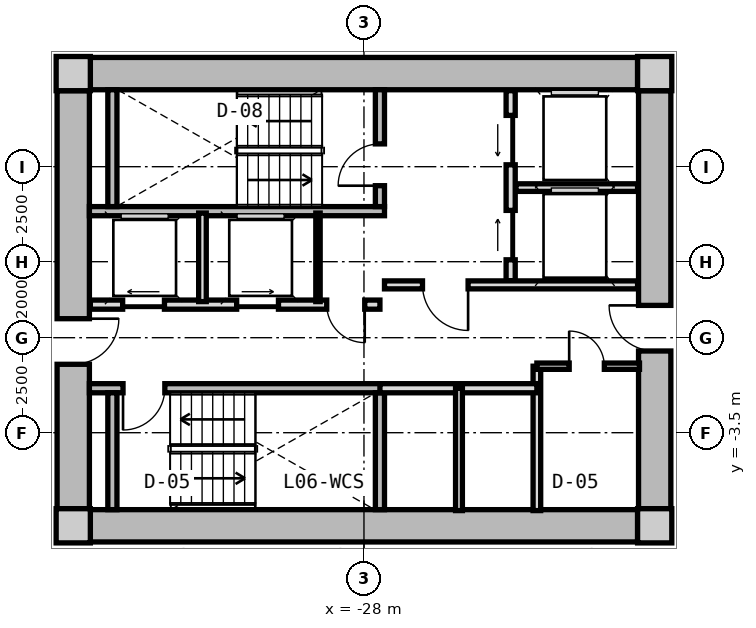
"""IFC4 building model, lengths in metres.
Left out: names, types, materials, properties, quantities, classifications, styles, units other than length and angle.
Written with IfcOpenShell. Run it as: python <this file> out.ifc"""

import sys

from ifc_helpers import new_model, si_unit, direction, frame, frame_2d, origin, origin_2d, place, context, subcontext, project, spatial, rectangle, extrude, source, transform, mapped, element, fill, save


model = new_model("IFC4")
c1 = context("Model", 3, precision=1e-05, world=origin(), true_north=direction((0.0, 1.0)))
c2 = subcontext(c1, "Body", "Model", "MODEL_VIEW")
j1 = project(units=[si_unit("LENGTHUNIT", "METRE"), si_unit("PLANEANGLEUNIT", "RADIAN")], contexts=[c1])
p1 = place(None, origin())
s1 = spatial("IfcSite", under=j1, at=p1, CompositionType="ELEMENT")
p2 = place(p1, origin())
s2 = spatial("IfcBuilding", under=s1, at=p2, CompositionType="ELEMENT")
p3 = place(p2, frame((0.0, 0.0, 24.65)))
s3 = spatial("IfcBuildingStorey", under=s2, at=p3, CompositionType="ELEMENT", Elevation=24.65)
m1 = source(origin(), c2, "Body", "SweptSolid", [
    extrude(rectangle(XDim=0.9, YDim=0.9, at=origin_2d()), origin(), (0.0, 0.0, 1.0), 3.05),
])
for number, where, z_axis, x_axis in (
    (1, (-35.65, -5.95, 0.0), (0.0, 0.0, 1.0), (1.0, 0.0, 0.0)),
    (2, (-20.35, -5.95, 0.0), (0.0, 0.0, 1.0), (1.0, 0.0, 0.0)),
    (3, (-20.35, 5.95, 0.0), (0.0, 0.0, 1.0), (1.0, 0.0, 0.0)),
    (4, (-35.65, 5.95, 0.0), (0.0, 0.0, 1.0), (1.0, 0.0, 0.0)),
):
    element("IfcColumn", number, at=place(p3, frame(where, z_axis=z_axis, x_axis=x_axis)), inside=s3, PredefinedType="COLUMN", context=c2, shape_type="MappedRepresentation", body=[
        mapped(m1, transform((0.0, 0.0, 0.0), x_axis=(1.0, 0.0, 0.0), y_axis=(0.0, 1.0, 0.0), z_axis=(0.0, 0.0, 1.0), scale=1.0)),
    ])
m2 = source(origin(), c2, "Body", "SweptSolid", [
    extrude(rectangle(XDim=14.4, YDim=0.85, at=frame_2d((7.2, 0.0))), origin(), (0.0, 0.0, 1.0), 2.79),
])
for number, where, z_axis, x_axis in (
    (5, (-35.2, 5.95, 0.0), (0.0, 0.0, 1.0), (1.0, 0.0, 0.0)),
    (6, (-20.8, -5.95, 0.0), (0.0, 0.0, 1.0), (-1.0, 0.0, 0.0)),
):
    element("IfcWall", number, at=place(p3, frame(where, z_axis=z_axis, x_axis=x_axis)), inside=s3, PredefinedType="SHEAR", context=c2, shape_type="MappedRepresentation", body=[
        mapped(m2, transform((0.0, 0.0, 0.0), x_axis=(1.0, 0.0, 0.0), y_axis=(0.0, 1.0, 0.0), z_axis=(0.0, 0.0, 1.0), scale=1.0)),
    ])
m3 = source(origin(), c2, "Body", "SweptSolid", [
    extrude(rectangle(XDim=11.0, YDim=0.85, at=frame_2d((5.5, 0.0))), origin(), (0.0, 0.0, 1.0), 2.79),
])
p4 = place(p3, frame((-35.65, -5.5, 0.0), z_axis=(0.0, 0.0, 1.0), x_axis=(0.0, 1.0, 0.0)))
e7 = element("IfcWall", 7, at=p4, inside=s3, PredefinedType="SHEAR", context=c2, shape_type="MappedRepresentation", body=[
    mapped(m3, transform((0.0, 0.0, 0.0), x_axis=(1.0, 0.0, 0.0), y_axis=(0.0, 1.0, 0.0), z_axis=(0.0, 0.0, 1.0), scale=1.0)),
])
p5 = place(p4, frame((3.8, 0.0, 0.0)))
e8 = element("IfcOpeningElement", 8, at=p5, cuts=e7, PredefinedType="OPENING", context=c2, shape_type="SweptSolid", body=[
    extrude(rectangle(XDim=1.2, YDim=2.15, at=frame_2d((0.6, 1.075))), frame((0.0, 0.435, 0.0), z_axis=(0.0, -1.0, 0.0), x_axis=(1.0, 0.0, 0.0)), (0.0, 0.0, 1.0), 0.87),
])
p6 = place(p3, frame((-20.35, 5.5, 0.0), z_axis=(0.0, 0.0, 1.0), x_axis=(0.0, -1.0, 0.0)))
e9 = element("IfcWall", 9, at=p6, inside=s3, PredefinedType="SHEAR", context=c2, shape_type="MappedRepresentation", body=[
    mapped(m3, transform((0.0, 0.0, 0.0), x_axis=(1.0, 0.0, 0.0), y_axis=(0.0, 1.0, 0.0), z_axis=(0.0, 0.0, 1.0), scale=1.0)),
])
p7 = place(p6, frame((5.65, 0.0, 0.0)))
e10 = element("IfcOpeningElement", 10, at=p7, cuts=e9, PredefinedType="OPENING", context=c2, shape_type="SweptSolid", body=[
    extrude(rectangle(XDim=1.2, YDim=2.15, at=frame_2d((0.6, 1.075))), frame((0.0, 0.435, 0.0), z_axis=(0.0, -1.0, 0.0), x_axis=(1.0, 0.0, 0.0)), (0.0, 0.0, 1.0), 0.87),
])
m4 = source(origin(), c2, "Body", "SweptSolid", [
    extrude(rectangle(XDim=7.765, YDim=0.24, at=frame_2d((3.883, 0.0))), origin(), (0.0, 0.0, 1.0), 2.79),
])
p8 = place(p3, frame((-35.225, 2.33, 0.0), z_axis=(0.0, 0.0, 1.0), x_axis=(1.0, 0.0, 0.0)))
e11 = element("IfcWall", 11, at=p8, inside=s3, PredefinedType="PARTITIONING", context=c2, shape_type="MappedRepresentation", body=[
    mapped(m4, transform((0.0, 0.0, 0.0), x_axis=(1.0, 0.0, 0.0), y_axis=(0.0, 1.0, 0.0), z_axis=(0.0, 0.0, 1.0), scale=1.0)),
])
m5 = source(origin(), c2, "Body", "SweptSolid", [
    extrude(rectangle(XDim=3.075, YDim=0.24, at=frame_2d((1.538, 0.0))), origin(), (0.0, 0.0, 1.0), 2.79),
])
p9 = place(p3, frame((-34.62, 2.45, 0.0), z_axis=(0.0, 0.0, 1.0), x_axis=(0.0, 1.0, 0.0)))
e12 = element("IfcWall", 12, at=p9, inside=s3, PredefinedType="PARTITIONING", context=c2, shape_type="MappedRepresentation", body=[
    mapped(m5, transform((0.0, 0.0, 0.0), x_axis=(1.0, 0.0, 0.0), y_axis=(0.0, 1.0, 0.0), z_axis=(0.0, 0.0, 1.0), scale=1.0)),
])
p10 = place(p3, frame((-27.58, 2.45, 0.0), z_axis=(0.0, 0.0, 1.0), x_axis=(0.0, 1.0, 0.0)))
e13 = element("IfcWall", 13, at=p10, inside=s3, PredefinedType="PARTITIONING", context=c2, shape_type="MappedRepresentation", body=[
    mapped(m5, transform((0.0, 0.0, 0.0), x_axis=(1.0, 0.0, 0.0), y_axis=(0.0, 1.0, 0.0), z_axis=(0.0, 0.0, 1.0), scale=1.0)),
])
p11 = place(p10, frame((0.55, 0.0, 0.0)))
e14 = element("IfcOpeningElement", 14, at=p11, cuts=e13, PredefinedType="OPENING", context=c2, shape_type="SweptSolid", body=[
    extrude(rectangle(XDim=1.1, YDim=2.15, at=frame_2d((0.55, 1.075))), frame((0.0, 0.13, 0.0), z_axis=(0.0, -1.0, 0.0), x_axis=(1.0, 0.0, 0.0)), (0.0, 0.0, 1.0), 0.26),
])
p12 = place(p3, frame((-35.225, -2.33, 0.0), z_axis=(0.0, 0.0, 1.0), x_axis=(1.0, 0.0, 0.0)))
e15 = element("IfcWall", 15, at=p12, inside=s3, PredefinedType="PARTITIONING", context=c2, shape_type="MappedRepresentation", body=[
    mapped(m4, transform((0.0, 0.0, 0.0), x_axis=(1.0, 0.0, 0.0), y_axis=(0.0, 1.0, 0.0), z_axis=(0.0, 0.0, 1.0), scale=1.0)),
])
p13 = place(p12, frame((0.885, 0.0, 0.0)))
e16 = element("IfcOpeningElement", 16, at=p13, cuts=e15, PredefinedType="OPENING", context=c2, shape_type="SweptSolid", body=[
    extrude(rectangle(XDim=1.1, YDim=2.15, at=frame_2d((0.55, 1.075))), frame((0.0, 0.13, 0.0), z_axis=(0.0, -1.0, 0.0), x_axis=(1.0, 0.0, 0.0)), (0.0, 0.0, 1.0), 0.26),
])
for number, where, z_axis, x_axis in (
    (17, (-34.62, -5.525, 0.0), (0.0, 0.0, 1.0), (0.0, 1.0, 0.0)),
    (18, (-27.58, -5.525, 0.0), (0.0, 0.0, 1.0), (0.0, 1.0, 0.0)),
):
    element("IfcWall", number, at=place(p3, frame(where, z_axis=z_axis, x_axis=x_axis)), inside=s3, PredefinedType="PARTITIONING", context=c2, shape_type="MappedRepresentation", body=[
        mapped(m5, transform((0.0, 0.0, 0.0), x_axis=(1.0, 0.0, 0.0), y_axis=(0.0, 1.0, 0.0), z_axis=(0.0, 0.0, 1.0), scale=1.0)),
    ])
m6 = source(origin(), c2, "Body", "SweptSolid", [
    extrude(rectangle(XDim=5.0, YDim=0.24, at=frame_2d((2.5, 0.0))), origin(), (0.0, 0.0, 1.0), 2.775),
])
p14 = place(p3, frame((-24.14, 0.5, 0.0), z_axis=(0.0, 0.0, 1.0), x_axis=(0.0, 1.0, 0.0)))
e19 = element("IfcWall", 19, at=p14, inside=s3, PredefinedType="PARTITIONING", context=c2, shape_type="MappedRepresentation", body=[
    mapped(m6, transform((0.0, 0.0, 0.0), x_axis=(1.0, 0.0, 0.0), y_axis=(0.0, 1.0, 0.0), z_axis=(0.0, 0.0, 1.0), scale=1.0)),
])
p15 = place(p14, frame((3.05, 0.0, 0.0)))
e20 = element("IfcOpeningElement", 20, at=p15, cuts=e19, PredefinedType="OPENING", context=c2, shape_type="SweptSolid", body=[
    extrude(rectangle(XDim=1.3, YDim=2.2, at=frame_2d((0.65, 1.1))), frame((0.0, 0.13, 0.0), z_axis=(0.0, -1.0, 0.0), x_axis=(1.0, 0.0, 0.0)), (0.0, 0.0, 1.0), 0.26),
])
p16 = place(p14, frame((0.55, 0.0, 0.0)))
e21 = element("IfcOpeningElement", 21, at=p16, cuts=e19, PredefinedType="OPENING", context=c2, shape_type="SweptSolid", body=[
    extrude(rectangle(XDim=1.3, YDim=2.2, at=frame_2d((0.65, 1.1))), frame((0.0, 0.13, 0.0), z_axis=(0.0, -1.0, 0.0), x_axis=(1.0, 0.0, 0.0)), (0.0, 0.0, 1.0), 0.26),
])
m7 = source(origin(), c2, "Body", "SweptSolid", [
    extrude(rectangle(XDim=3.2, YDim=0.2, at=frame_2d((1.6, 0.0))), origin(), (0.0, 0.0, 1.0), 2.775),
])
p17 = place(p3, frame((-24.0, 2.95, 0.0), z_axis=(0.0, 0.0, 1.0), x_axis=(1.0, 0.0, 0.0)))
e22 = element("IfcWall", 22, at=p17, inside=s3, PredefinedType="PARTITIONING", context=c2, shape_type="MappedRepresentation", body=[
    mapped(m7, transform((0.0, 0.0, 0.0), x_axis=(1.0, 0.0, 0.0), y_axis=(0.0, 1.0, 0.0), z_axis=(0.0, 0.0, 1.0), scale=1.0)),
])
m8 = source(origin(), c2, "Body", "SweptSolid", [
    extrude(rectangle(XDim=6.66, YDim=0.21, at=frame_2d((3.33, 0.0))), origin(), (0.0, 0.0, 1.0), 2.775),
])
p18 = place(p3, frame((-27.46, 0.39, 0.0), z_axis=(0.0, 0.0, 1.0), x_axis=(1.0, 0.0, 0.0)))
e23 = element("IfcWall", 23, at=p18, inside=s3, PredefinedType="PARTITIONING", context=c2, shape_type="MappedRepresentation", body=[
    mapped(m8, transform((0.0, 0.0, 0.0), x_axis=(1.0, 0.0, 0.0), y_axis=(0.0, 1.0, 0.0), z_axis=(0.0, 0.0, 1.0), scale=1.0)),
])
p19 = place(p18, frame((1.0, 0.0, 0.0)))
e24 = element("IfcOpeningElement", 24, at=p19, cuts=e23, PredefinedType="OPENING", context=c2, shape_type="SweptSolid", body=[
    extrude(rectangle(XDim=1.2, YDim=2.15, at=frame_2d((0.6, 1.075))), frame((0.0, 0.115, 0.0), z_axis=(0.0, -1.0, 0.0), x_axis=(1.0, 0.0, 0.0)), (0.0, 0.0, 1.0), 0.23),
])
m9 = source(origin(), c2, "Body", "SweptSolid", [
    extrude(rectangle(XDim=7.62, YDim=0.24, at=frame_2d((3.81, 0.0))), origin(), (0.0, 0.0, 1.0), 2.775),
])
p20 = place(p3, frame((-35.2, -0.13, 0.0), z_axis=(0.0, 0.0, 1.0), x_axis=(1.0, 0.0, 0.0)))
e25 = element("IfcWall", 25, at=p20, inside=s3, PredefinedType="PARTITIONING", context=c2, shape_type="MappedRepresentation", body=[
    mapped(m9, transform((0.0, 0.0, 0.0), x_axis=(1.0, 0.0, 0.0), y_axis=(0.0, 1.0, 0.0), z_axis=(0.0, 0.0, 1.0), scale=1.0)),
])
p21 = place(p20, frame((6.22, 0.0, 0.0)))
e26 = element("IfcOpeningElement", 26, at=p21, cuts=e25, PredefinedType="OPENING", context=c2, shape_type="SweptSolid", body=[
    extrude(rectangle(XDim=1.0, YDim=2.1, at=frame_2d((0.5, 1.05))), frame((0.0, 0.13, 0.0), z_axis=(0.0, -1.0, 0.0), x_axis=(1.0, 0.0, 0.0)), (0.0, 0.0, 1.0), 0.26),
])
p22 = place(p20, frame((0.85, 0.0, 0.0)))
e27 = element("IfcOpeningElement", 27, at=p22, cuts=e25, PredefinedType="OPENING", context=c2, shape_type="SweptSolid", body=[
    extrude(rectangle(XDim=1.1, YDim=2.2, at=frame_2d((0.55, 1.1))), frame((0.0, 0.13, 0.0), z_axis=(0.0, -1.0, 0.0), x_axis=(1.0, 0.0, 0.0)), (0.0, 0.0, 1.0), 0.26),
])
p23 = place(p20, frame((3.85, 0.0, 0.0)))
e28 = element("IfcOpeningElement", 28, at=p23, cuts=e25, PredefinedType="OPENING", context=c2, shape_type="SweptSolid", body=[
    extrude(rectangle(XDim=1.1, YDim=2.2, at=frame_2d((0.55, 1.1))), frame((0.0, 0.13, 0.0), z_axis=(0.0, -1.0, 0.0), x_axis=(1.0, 0.0, 0.0)), (0.0, 0.0, 1.0), 0.26),
])
m10 = source(origin(), c2, "Body", "SweptSolid", [
    extrude(rectangle(XDim=2.33, YDim=0.115, at=frame_2d((1.165, 0.0))), origin(), (0.0, 0.0, 1.0), 2.775),
])
p24 = place(p3, frame((-29.21, -0.05, 0.0), z_axis=(0.0, 0.0, 1.0), x_axis=(0.0, 1.0, 0.0)))
e29 = element("IfcWall", 29, at=p24, inside=s3, PredefinedType="PARTITIONING", context=c2, shape_type="MappedRepresentation", body=[
    mapped(m10, transform((0.0, 0.0, 0.0), x_axis=(1.0, 0.0, 0.0), y_axis=(0.0, 1.0, 0.0), z_axis=(0.0, 0.0, 1.0), scale=1.0)),
])
m11 = source(origin(), c2, "Body", "SweptSolid", [
    extrude(rectangle(XDim=2.33, YDim=0.2, at=frame_2d((1.165, 0.0))), origin(), (0.0, 0.0, 1.0), 2.775),
])
p25 = place(p3, frame((-32.25, -0.05, 0.0), z_axis=(0.0, 0.0, 1.0), x_axis=(0.0, 1.0, 0.0)))
e30 = element("IfcWall", 30, at=p25, inside=s3, PredefinedType="PARTITIONING", context=c2, shape_type="MappedRepresentation", body=[
    mapped(m11, transform((0.0, 0.0, 0.0), x_axis=(1.0, 0.0, 0.0), y_axis=(0.0, 1.0, 0.0), z_axis=(0.0, 0.0, 1.0), scale=1.0)),
])
m12 = source(origin(), c2, "Body", "SweptSolid", [
    extrude(rectangle(XDim=3.8, YDim=0.2, at=frame_2d((1.9, 0.0))), origin(), (0.0, 0.0, 1.0), 2.775),
])
p26 = place(p3, frame((-23.45, -5.55, 0.0), z_axis=(0.0, 0.0, 1.0), x_axis=(0.0, 1.0, 0.0)))
e31 = element("IfcWall", 31, at=p26, inside=s3, PredefinedType="PARTITIONING", context=c2, shape_type="MappedRepresentation", body=[
    mapped(m12, transform((0.0, 0.0, 0.0), x_axis=(1.0, 0.0, 0.0), y_axis=(0.0, 1.0, 0.0), z_axis=(0.0, 0.0, 1.0), scale=1.0)),
])
m13 = source(origin(), c2, "Body", "SweptSolid", [
    extrude(rectangle(XDim=4.13, YDim=0.24, at=frame_2d((2.065, 0.0))), origin(), (0.0, 0.0, 1.0), 2.775),
])
p27 = place(p3, frame((-27.58, -2.33, 0.0), z_axis=(0.0, 0.0, 1.0), x_axis=(1.0, 0.0, 0.0)))
e32 = element("IfcWall", 32, at=p27, inside=s3, PredefinedType="PARTITIONING", context=c2, shape_type="MappedRepresentation", body=[
    mapped(m13, transform((0.0, 0.0, 0.0), x_axis=(1.0, 0.0, 0.0), y_axis=(0.0, 1.0, 0.0), z_axis=(0.0, 0.0, 1.0), scale=1.0)),
])
m14 = source(origin(), c2, "Body", "SweptSolid", [
    extrude(rectangle(XDim=3.22, YDim=0.18, at=frame_2d((1.61, 0.0))), origin(), (0.0, 0.0, 1.0), 2.775),
])
p28 = place(p3, frame((-25.5, -5.55, 0.0), z_axis=(0.0, 0.0, 1.0), x_axis=(0.0, 1.0, 0.0)))
e33 = element("IfcWall", 33, at=p28, inside=s3, PredefinedType="PARTITIONING", context=c2, shape_type="MappedRepresentation", body=[
    mapped(m14, transform((0.0, 0.0, 0.0), x_axis=(1.0, 0.0, 0.0), y_axis=(0.0, 1.0, 0.0), z_axis=(0.0, 0.0, 1.0), scale=1.0)),
])
m15 = source(origin(), c2, "Body", "SweptSolid", [
    extrude(rectangle(XDim=2.7, YDim=0.165, at=frame_2d((1.35, 0.0))), origin(), (0.0, 0.0, 1.0), 2.775),
])
p29 = place(p3, frame((-23.45, -1.75, 0.0), z_axis=(0.0, 0.0, 1.0), x_axis=(1.0, 0.0, 0.0)))
e34 = element("IfcWall", 34, at=p29, inside=s3, PredefinedType="PARTITIONING", context=c2, shape_type="MappedRepresentation", body=[
    mapped(m15, transform((0.0, 0.0, 0.0), x_axis=(1.0, 0.0, 0.0), y_axis=(0.0, 1.0, 0.0), z_axis=(0.0, 0.0, 1.0), scale=1.0)),
])
p30 = place(p29, frame((0.85, 0.0, 0.0)))
e35 = element("IfcOpeningElement", 35, at=p30, cuts=e34, PredefinedType="OPENING", context=c2, shape_type="SweptSolid", body=[
    extrude(rectangle(XDim=0.925, YDim=2.1, at=frame_2d((0.462, 1.05))), frame((0.0, 0.093, 0.0), z_axis=(0.0, -1.0, 0.0), x_axis=(1.0, 0.0, 0.0)), (0.0, 0.0, 1.0), 0.185),
])
m16 = source(origin(), c2, "Body", "SweptSolid", [
    extrude(rectangle(XDim=1.1, YDim=2.15, at=frame_2d((0.55, 1.075))), frame((0.0, 0.025, 0.0), z_axis=(0.0, -1.0, 0.0), x_axis=(1.0, 0.0, 0.0)), (0.0, 0.0, 1.0), 0.05),
])
p31 = place(p11, origin())
e36 = element("IfcDoor", 36, at=p31, inside=s3, OperationType="SINGLE_SWING_LEFT", PredefinedType="DOOR", context=c2, shape_type="MappedRepresentation", body=[
    mapped(m16, transform((0.0, 0.0, 0.0), x_axis=(1.0, 0.0, 0.0), y_axis=(0.0, 1.0, 0.0), z_axis=(0.0, 0.0, 1.0), scale=1.0)),
])
fill(e14, e36)
p32 = place(p13, frame((1.1, 0.0, 0.0), z_axis=(0.0, 0.0, 1.0), x_axis=(-1.0, 0.0, 0.0)))
e37 = element("IfcDoor", 37, at=p32, inside=s3, OperationType="SINGLE_SWING_RIGHT", PredefinedType="DOOR", context=c2, shape_type="MappedRepresentation", body=[
    mapped(m16, transform((0.0, 0.0, 0.0), x_axis=(1.0, 0.0, 0.0), y_axis=(0.0, 1.0, 0.0), z_axis=(0.0, 0.0, 1.0), scale=1.0)),
])
fill(e16, e37)
m17 = source(origin(), c2, "Body", "SweptSolid", [
    extrude(rectangle(XDim=1.3, YDim=2.2, at=frame_2d((0.65, 1.1))), frame((0.0, 0.025, 0.0), z_axis=(0.0, -1.0, 0.0), x_axis=(1.0, 0.0, 0.0)), (0.0, 0.0, 1.0), 0.05),
])
p33 = place(p15, origin())
e38 = element("IfcDoor", 38, at=p33, inside=s3, OperationType="SLIDING_TO_LEFT", PredefinedType="DOOR", context=c2, shape_type="MappedRepresentation", body=[
    mapped(m17, transform((0.0, 0.0, 0.0), x_axis=(1.0, 0.0, 0.0), y_axis=(0.0, 1.0, 0.0), z_axis=(0.0, 0.0, 1.0), scale=1.0)),
])
fill(e20, e38)
p34 = place(p16, origin())
e39 = element("IfcDoor", 39, at=p34, inside=s3, OperationType="SLIDING_TO_RIGHT", PredefinedType="DOOR", context=c2, shape_type="MappedRepresentation", body=[
    mapped(m17, transform((0.0, 0.0, 0.0), x_axis=(1.0, 0.0, 0.0), y_axis=(0.0, 1.0, 0.0), z_axis=(0.0, 0.0, 1.0), scale=1.0)),
])
fill(e21, e39)
m18 = source(origin(), c2, "Body", "SweptSolid", [
    extrude(rectangle(XDim=1.2, YDim=2.15, at=frame_2d((0.6, 1.075))), frame((0.0, 0.025, 0.0), z_axis=(0.0, -1.0, 0.0), x_axis=(1.0, 0.0, 0.0)), (0.0, 0.0, 1.0), 0.05),
])
p35 = place(p19, frame((1.2, 0.0, 0.0), z_axis=(0.0, 0.0, 1.0), x_axis=(-1.0, 0.0, 0.0)))
e40 = element("IfcDoor", 40, at=p35, inside=s3, OperationType="SINGLE_SWING_LEFT", PredefinedType="DOOR", context=c2, shape_type="MappedRepresentation", body=[
    mapped(m18, transform((0.0, 0.0, 0.0), x_axis=(1.0, 0.0, 0.0), y_axis=(0.0, 1.0, 0.0), z_axis=(0.0, 0.0, 1.0), scale=1.0)),
])
fill(e24, e40)
p36 = place(p5, frame((1.2, 0.0, 0.0), z_axis=(0.0, 0.0, 1.0), x_axis=(-1.0, 0.0, 0.0)))
e41 = element("IfcDoor", 41, at=p36, inside=s3, OperationType="SINGLE_SWING_LEFT", PredefinedType="DOOR", context=c2, shape_type="MappedRepresentation", body=[
    mapped(m18, transform((0.0, 0.0, 0.0), x_axis=(1.0, 0.0, 0.0), y_axis=(0.0, 1.0, 0.0), z_axis=(0.0, 0.0, 1.0), scale=1.0)),
])
fill(e8, e41)
p37 = place(p7, frame((1.2, 0.0, 0.0), z_axis=(0.0, 0.0, 1.0), x_axis=(-1.0, 0.0, 0.0)))
e42 = element("IfcDoor", 42, at=p37, inside=s3, OperationType="SINGLE_SWING_RIGHT", PredefinedType="DOOR", context=c2, shape_type="MappedRepresentation", body=[
    mapped(m18, transform((0.0, 0.0, 0.0), x_axis=(1.0, 0.0, 0.0), y_axis=(0.0, 1.0, 0.0), z_axis=(0.0, 0.0, 1.0), scale=1.0)),
])
fill(e10, e42)
m19 = source(origin(), c2, "Body", "SweptSolid", [
    extrude(rectangle(XDim=1.0, YDim=2.1, at=frame_2d((0.5, 1.05))), frame((0.0, 0.025, 0.0), z_axis=(0.0, -1.0, 0.0), x_axis=(1.0, 0.0, 0.0)), (0.0, 0.0, 1.0), 0.05),
])
p38 = place(p21, frame((1.0, 0.0, 0.0), z_axis=(0.0, 0.0, 1.0), x_axis=(-1.0, 0.0, 0.0)))
e43 = element("IfcDoor", 43, at=p38, inside=s3, OperationType="SINGLE_SWING_LEFT", PredefinedType="DOOR", context=c2, shape_type="MappedRepresentation", body=[
    mapped(m19, transform((0.0, 0.0, 0.0), x_axis=(1.0, 0.0, 0.0), y_axis=(0.0, 1.0, 0.0), z_axis=(0.0, 0.0, 1.0), scale=1.0)),
])
fill(e26, e43)
m20 = source(origin(), c2, "Body", "SweptSolid", [
    extrude(rectangle(XDim=1.1, YDim=2.2, at=frame_2d((0.55, 1.1))), frame((0.0, 0.025, 0.0), z_axis=(0.0, -1.0, 0.0), x_axis=(1.0, 0.0, 0.0)), (0.0, 0.0, 1.0), 0.05),
])
p39 = place(p22, origin())
e44 = element("IfcDoor", 44, at=p39, inside=s3, OperationType="SLIDING_TO_LEFT", PredefinedType="DOOR", context=c2, shape_type="MappedRepresentation", body=[
    mapped(m20, transform((0.0, 0.0, 0.0), x_axis=(1.0, 0.0, 0.0), y_axis=(0.0, 1.0, 0.0), z_axis=(0.0, 0.0, 1.0), scale=1.0)),
])
fill(e27, e44)
p40 = place(p23, origin())
e45 = element("IfcDoor", 45, at=p40, inside=s3, OperationType="SLIDING_TO_RIGHT", PredefinedType="DOOR", context=c2, shape_type="MappedRepresentation", body=[
    mapped(m20, transform((0.0, 0.0, 0.0), x_axis=(1.0, 0.0, 0.0), y_axis=(0.0, 1.0, 0.0), z_axis=(0.0, 0.0, 1.0), scale=1.0)),
])
fill(e28, e45)
m21 = source(origin(), c2, "Body", "SweptSolid", [
    extrude(rectangle(XDim=0.925, YDim=2.1, at=frame_2d((0.462, 1.05))), frame((0.0, 0.025, 0.0), z_axis=(0.0, -1.0, 0.0), x_axis=(1.0, 0.0, 0.0)), (0.0, 0.0, 1.0), 0.05),
])
p41 = place(p30, origin())
e46 = element("IfcDoor", 46, at=p41, inside=s3, OperationType="SINGLE_SWING_LEFT", PredefinedType="DOOR", context=c2, shape_type="MappedRepresentation", body=[
    mapped(m21, transform((0.0, 0.0, 0.0), x_axis=(1.0, 0.0, 0.0), y_axis=(0.0, 1.0, 0.0), z_axis=(0.0, 0.0, 1.0), scale=1.0)),
])
fill(e35, e46)
save(model, sys.argv[1])
